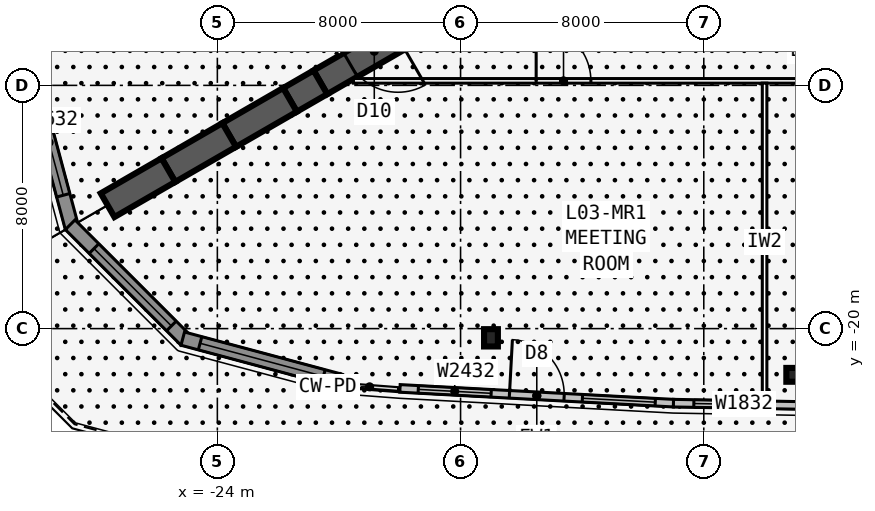
"""IFC4 building model, lengths in metres.
Left out: names, types, materials, properties, quantities, classifications, styles, units other than length and angle.
Written with IfcOpenShell. Run it as: python <this file> out.ifc"""

import sys

from ifc_helpers import new_model, si_unit, direction, frame, frame_2d, origin, origin_2d, place, context, subcontext, project, spatial, rectangle, i_section, extrude, element, fill, save


model = new_model("IFC4")
c1 = context("Model", 3, precision=1e-05, world=origin(), true_north=direction((0.0, 1.0)))
c2 = subcontext(c1, "Body", "Model", "MODEL_VIEW")
j1 = project(units=[si_unit("LENGTHUNIT", "METRE"), si_unit("PLANEANGLEUNIT", "RADIAN")], contexts=[c1])
p1 = place(None, origin())
s1 = spatial("IfcSite", under=j1, at=p1, CompositionType="ELEMENT")
p2 = place(p1, origin())
s2 = spatial("IfcBuilding", under=s1, at=p2, CompositionType="ELEMENT")
p3 = place(p2, frame((0.0, 0.0, 17.5)))
s3 = spatial("IfcBuildingStorey", under=s2, at=p3, CompositionType="ELEMENT", Elevation=17.5)
p4 = place(p3, frame((-16.5, -9.526, 0.0), z_axis=(0.0, 0.0, 1.0), x_axis=(-0.866031398331, -0.499989616998, 0.0)))
e1 = element("IfcWall", 1, at=p4, inside=s3, PredefinedType="SHEAR", context=c2, shape_type="SweptSolid", body=[
    extrude(rectangle(XDim=4.746, YDim=0.9, at=frame_2d((2.373, 0.0))), origin(), (0.0, 0.0, 1.0), 5.0),
])
p5 = place(p4, frame((1.8, 0.0, 0.0)))
e2 = element("IfcOpeningElement", 2, at=p5, cuts=e1, PredefinedType="OPENING", context=c2, shape_type="SweptSolid", body=[
    extrude(rectangle(XDim=1.8, YDim=2.13, at=frame_2d((0.9, 1.065))), frame((0.0, 0.46, 0.0), z_axis=(0.0, -1.0, 0.0), x_axis=(1.0, 0.0, 0.0)), (0.0, 0.0, 1.0), 0.92),
])
p6 = place(p3, frame((-20.61, -11.899, 0.0), z_axis=(0.0, 0.0, 1.0), x_axis=(-0.866009537788, -0.500027479704, 0.0)))
e3 = element("IfcWall", 3, at=p6, inside=s3, PredefinedType="SHEAR", context=c2, shape_type="SweptSolid", body=[
    extrude(rectangle(XDim=1.155, YDim=0.9, at=frame_2d((0.577, 0.0))), origin(), (0.0, 0.0, 1.0), 5.0),
])
for number, where, z_axis, x_axis in (
    (4, (-21.61, -12.477, 0.0), (0.0, 0.0, 1.0), (-0.866, -0.5, 0.0)),
    (5, (-23.61, -13.631, 0.0), (0.0, 0.0, 1.0), (-0.866, -0.5, 0.0)),
    (6, (-25.61, -14.786, 0.0), (0.0, 0.0, 1.0), (-0.866, -0.5, 0.0)),
):
    element("IfcWall", number, at=place(p3, frame(where, z_axis=z_axis, x_axis=x_axis)), inside=s3, PredefinedType="SHEAR", context=c2, shape_type="SweptSolid", body=[
        extrude(rectangle(XDim=2.309, YDim=0.9, at=frame_2d((1.155, 0.0))), origin(), (0.0, 0.0, 1.0), 5.0),
    ])
for number, where, z_axis, x_axis in (
    (7, (-15.0, -20.303, 0.0), (0.0, 0.0, 1.0), (1.0, 0.0, 0.0)),
    (8, (-5.0, -21.521, 0.0), (0.0, 0.0, 1.0), (0.0, -1.0, 0.0)),
):
    element("IfcColumn", number, at=place(p3, frame(where, z_axis=z_axis, x_axis=x_axis)), inside=s3, PredefinedType="COLUMN", context=c2, shape_type="SweptSolid", body=[
        extrude(i_section(OverallWidth=0.455, OverallDepth=0.569, WebThickness=0.078, FlangeThickness=0.125, at=origin_2d()), origin(), (0.0, 0.0, 1.0), 5.0),
    ])
p7 = place(p3, frame((-17.993, -21.967, 0.0), z_axis=(0.0, 0.0, 1.0), x_axis=(0.998546137511, -0.053903722158, 0.0)))
e9 = element("IfcWall", 9, at=p7, inside=s3, PredefinedType="STANDARD", context=c2, shape_type="SweptSolid", body=[
    extrude(rectangle(XDim=9.013, YDim=0.25, at=frame_2d((4.507, 0.0))), origin(), (0.0, 0.0, 1.0), 4.75),
])
p8 = place(p7, frame((3.607, 0.0, 0.0)))
e10 = element("IfcOpeningElement", 10, at=p8, cuts=e9, PredefinedType="OPENING", context=c2, shape_type="SweptSolid", body=[
    extrude(rectangle(XDim=1.8, YDim=2.4, at=frame_2d((0.9, 1.2))), frame((0.0, 0.135, 0.0), z_axis=(0.0, -1.0, 0.0), x_axis=(1.0, 0.0, 0.0)), (0.0, 0.0, 1.0), 0.27),
])
p9 = place(p7, frame((0.603, 0.0, 0.6)))
e11 = element("IfcOpeningElement", 11, at=p9, cuts=e9, PredefinedType="OPENING", context=c2, shape_type="SweptSolid", body=[
    extrude(rectangle(XDim=2.4, YDim=3.2, at=frame_2d((1.2, 1.6))), frame((0.0, 0.135, 0.0), z_axis=(0.0, -1.0, 0.0), x_axis=(1.0, 0.0, 0.0)), (0.0, 0.0, 1.0), 0.27),
])
p10 = place(p7, frame((6.01, 0.0, 0.6)))
e12 = element("IfcOpeningElement", 12, at=p10, cuts=e9, PredefinedType="OPENING", context=c2, shape_type="SweptSolid", body=[
    extrude(rectangle(XDim=2.4, YDim=3.2, at=frame_2d((1.2, 1.6))), frame((0.0, 0.135, 0.0), z_axis=(0.0, -1.0, 0.0), x_axis=(1.0, 0.0, 0.0)), (0.0, 0.0, 1.0), 0.27),
])
p11 = place(p3, frame((-8.998, -22.452, 0.0), z_axis=(0.0, 0.0, 1.0), x_axis=(0.999838308644, -0.017982118018, 0.0)))
e13 = element("IfcWall", 13, at=p11, inside=s3, PredefinedType="STANDARD", context=c2, shape_type="SweptSolid", body=[
    extrude(rectangle(XDim=9.001, YDim=0.25, at=frame_2d((4.501, 0.0))), origin(), (0.0, 0.0, 1.0), 4.75),
])
p12 = place(p11, frame((0.671, 0.0, 0.6)))
e14 = element("IfcOpeningElement", 14, at=p12, cuts=e13, PredefinedType="OPENING", context=c2, shape_type="SweptSolid", body=[
    extrude(rectangle(XDim=1.8, YDim=3.2, at=frame_2d((0.9, 1.6))), frame((0.0, 0.135, 0.0), z_axis=(0.0, -1.0, 0.0), x_axis=(1.0, 0.0, 0.0)), (0.0, 0.0, 1.0), 0.27),
])
p13 = place(p11, frame((5.022, 0.0, 0.0)))
e15 = element("IfcOpeningElement", 15, at=p13, cuts=e13, PredefinedType="OPENING", context=c2, shape_type="SweptSolid", body=[
    extrude(rectangle(XDim=1.8, YDim=2.4, at=frame_2d((0.9, 1.2))), frame((0.0, 0.135, 0.0), z_axis=(0.0, -1.0, 0.0), x_axis=(1.0, 0.0, 0.0)), (0.0, 0.0, 1.0), 0.27),
])
p14 = place(p3, frame((-28.783, -6.409, 0.0), z_axis=(0.0, 0.0, 1.0), x_axis=(-0.258829095032, -0.965923133363, 0.0)))
e16 = element("IfcWall", 16, at=p14, inside=s3, PredefinedType="SOLIDWALL", context=c2, shape_type="SweptSolid", body=[
    extrude(rectangle(XDim=5.379, YDim=0.45, at=frame_2d((2.69, 0.0))), origin(), (0.0, 0.0, 1.0), 4.75),
])
p15 = place(p14, frame((0.59, 0.0, 0.6)))
e17 = element("IfcOpeningElement", 17, at=p15, cuts=e16, PredefinedType="OPENING", context=c2, shape_type="SweptSolid", body=[
    extrude(rectangle(XDim=4.2, YDim=3.2, at=frame_2d((2.1, 1.6))), frame((0.0, 0.235, 0.0), z_axis=(0.0, -1.0, 0.0), x_axis=(1.0, 0.0, 0.0)), (0.0, 0.0, 1.0), 0.47),
])
p16 = place(p3, frame((-30.175, -11.489, 0.0), z_axis=(0.0, 0.0, 1.0), x_axis=(0.258817748921, -0.965926173599, 0.0)))
e18 = element("IfcWall", 18, at=p16, inside=s3, PredefinedType="SOLIDWALL", context=c2, shape_type="SweptSolid", body=[
    extrude(rectangle(XDim=5.38, YDim=0.45, at=frame_2d((2.69, 0.0))), origin(), (0.0, 0.0, 1.0), 4.75),
])
p17 = place(p16, frame((0.671, 0.0, 0.6)))
e19 = element("IfcOpeningElement", 19, at=p17, cuts=e18, PredefinedType="OPENING", context=c2, shape_type="SweptSolid", body=[
    extrude(rectangle(XDim=3.6, YDim=3.2, at=frame_2d((1.8, 1.6))), frame((0.0, 0.235, 0.0), z_axis=(0.0, -1.0, 0.0), x_axis=(1.0, 0.0, 0.0)), (0.0, 0.0, 1.0), 0.47),
])
p18 = place(p3, frame((-28.841, -16.584, 0.0), z_axis=(0.0, 0.0, 1.0), x_axis=(0.707084088779, -0.707129472866, 0.0)))
e20 = element("IfcWall", 20, at=p18, inside=s3, PredefinedType="SOLIDWALL", context=c2, shape_type="SweptSolid", body=[
    extrude(rectangle(XDim=5.379, YDim=0.45, at=frame_2d((2.69, 0.0))), origin(), (0.0, 0.0, 1.0), 4.75),
])
p19 = place(p18, frame((1.108, 0.0, 0.6)))
e21 = element("IfcOpeningElement", 21, at=p19, cuts=e20, PredefinedType="OPENING", context=c2, shape_type="SweptSolid", body=[
    extrude(rectangle(XDim=3.6, YDim=3.2, at=frame_2d((1.8, 1.6))), frame((0.0, 0.235, 0.0), z_axis=(0.0, -1.0, 0.0), x_axis=(1.0, 0.0, 0.0)), (0.0, 0.0, 1.0), 0.47),
])
p20 = place(p3, frame((-25.138, -20.33, 0.0), z_axis=(0.0, 0.0, 1.0), x_axis=(0.965923133363, -0.258829095032, 0.0)))
e22 = element("IfcWall", 22, at=p20, inside=s3, PredefinedType="SOLIDWALL", context=c2, shape_type="SweptSolid", body=[
    extrude(rectangle(XDim=5.379, YDim=0.45, at=frame_2d((2.69, 0.0))), origin(), (0.0, 0.0, 1.0), 4.75),
])
p21 = place(p20, frame((0.59, 0.0, 0.6)))
e23 = element("IfcOpeningElement", 23, at=p21, cuts=e22, PredefinedType="OPENING", context=c2, shape_type="SweptSolid", body=[
    extrude(rectangle(XDim=4.2, YDim=3.2, at=frame_2d((2.1, 1.6))), frame((0.0, 0.235, 0.0), z_axis=(0.0, -1.0, 0.0), x_axis=(1.0, 0.0, 0.0)), (0.0, 0.0, 1.0), 0.47),
])
p22 = place(p3, frame((-19.527, -11.851, 0.0), z_axis=(0.0, 0.0, 1.0), x_axis=(1.0, 0.0, 0.0)))
e24 = element("IfcWall", 24, at=p22, inside=s3, PredefinedType="PARTITIONING", context=c2, shape_type="SweptSolid", body=[
    extrude(rectangle(XDim=39.054, YDim=0.15, at=frame_2d((19.527, 0.0))), origin(), (0.0, 0.0, 1.0), 4.75),
])
p23 = place(p22, frame((6.013, 0.0, 0.0)))
e25 = element("IfcOpeningElement", 25, at=p23, cuts=e24, PredefinedType="OPENING", context=c2, shape_type="SweptSolid", body=[
    extrude(rectangle(XDim=1.8, YDim=2.13, at=frame_2d((0.9, 1.065))), frame((0.0, 0.085, 0.0), z_axis=(0.0, -1.0, 0.0), x_axis=(1.0, 0.0, 0.0)), (0.0, 0.0, 1.0), 0.17),
])
p24 = place(p22, frame((16.627, 0.0, 0.0)))
e26 = element("IfcOpeningElement", 26, at=p24, cuts=e24, PredefinedType="OPENING", context=c2, shape_type="SweptSolid", body=[
    extrude(rectangle(XDim=1.8, YDim=2.13, at=frame_2d((0.9, 1.065))), frame((0.0, 0.085, 0.0), z_axis=(0.0, -1.0, 0.0), x_axis=(1.0, 0.0, 0.0)), (0.0, 0.0, 1.0), 0.17),
])
p25 = place(p22, frame((23.227, 0.0, 0.0)))
e27 = element("IfcOpeningElement", 27, at=p25, cuts=e24, PredefinedType="OPENING", context=c2, shape_type="SweptSolid", body=[
    extrude(rectangle(XDim=1.8, YDim=2.13, at=frame_2d((0.9, 1.065))), frame((0.0, 0.085, 0.0), z_axis=(0.0, -1.0, 0.0), x_axis=(1.0, 0.0, 0.0)), (0.0, 0.0, 1.0), 0.17),
])
p26 = place(p22, frame((31.841, 0.0, 0.0)))
e28 = element("IfcOpeningElement", 28, at=p26, cuts=e24, PredefinedType="OPENING", context=c2, shape_type="SweptSolid", body=[
    extrude(rectangle(XDim=1.8, YDim=2.13, at=frame_2d((0.9, 1.065))), frame((0.0, 0.085, 0.0), z_axis=(0.0, -1.0, 0.0), x_axis=(1.0, 0.0, 0.0)), (0.0, 0.0, 1.0), 0.17),
])
p27 = place(p3, frame((-6.0, -11.926, 0.0), z_axis=(0.0, 0.0, 1.0), x_axis=(0.0, -1.0, 0.0)))
e29 = element("IfcWall", 29, at=p27, inside=s3, PredefinedType="PARTITIONING", context=c2, shape_type="SweptSolid", body=[
    extrude(rectangle(XDim=10.455, YDim=0.15, at=frame_2d((5.228, 0.0))), origin(), (0.0, 0.0, 1.0), 4.75),
])
p28 = place(p3, frame((-0.5, 22.836, 0.0), z_axis=(0.0, 0.0, 1.0), x_axis=(-0.500001677587, -0.866024435227, 0.0)))
e30 = element("IfcWall", 30, at=p28, inside=s3, PredefinedType="PARTITIONING", context=c2, shape_type="SweptSolid", body=[
    extrude(rectangle(XDim=39.054, YDim=0.15, at=frame_2d((19.527, 0.0))), origin(), (0.0, 0.0, 1.0), 4.75),
])
p29 = place(p28, frame((10.414, 0.0, 0.0)))
e31 = element("IfcOpeningElement", 31, at=p29, cuts=e30, PredefinedType="OPENING", context=c2, shape_type="SweptSolid", body=[
    extrude(rectangle(XDim=1.0, YDim=2.13, at=frame_2d((0.5, 1.065))), frame((0.0, 0.085, 0.0), z_axis=(0.0, -1.0, 0.0), x_axis=(1.0, 0.0, 0.0)), (0.0, 0.0, 1.0), 0.17),
])
p30 = place(p28, frame((23.227, 0.0, 0.0)))
e32 = element("IfcOpeningElement", 32, at=p30, cuts=e30, PredefinedType="OPENING", context=c2, shape_type="SweptSolid", body=[
    extrude(rectangle(XDim=1.8, YDim=2.13, at=frame_2d((0.9, 1.065))), frame((0.0, 0.085, 0.0), z_axis=(0.0, -1.0, 0.0), x_axis=(1.0, 0.0, 0.0)), (0.0, 0.0, 1.0), 0.17),
])
p31 = place(p28, frame((27.627, 0.0, 0.0)))
e33 = element("IfcOpeningElement", 33, at=p31, cuts=e30, PredefinedType="OPENING", context=c2, shape_type="SweptSolid", body=[
    extrude(rectangle(XDim=1.0, YDim=2.13, at=frame_2d((0.5, 1.065))), frame((0.0, 0.085, 0.0), z_axis=(0.0, -1.0, 0.0), x_axis=(1.0, 0.0, 0.0)), (0.0, 0.0, 1.0), 0.17),
])
p32 = place(p28, frame((30.277, 0.0, 0.0)))
e34 = element("IfcOpeningElement", 34, at=p32, cuts=e30, PredefinedType="OPENING", context=c2, shape_type="SweptSolid", body=[
    extrude(rectangle(XDim=1.0, YDim=2.13, at=frame_2d((0.5, 1.065))), frame((0.0, 0.085, 0.0), z_axis=(0.0, -1.0, 0.0), x_axis=(1.0, 0.0, 0.0)), (0.0, 0.0, 1.0), 0.17),
])
p33 = place(p28, frame((34.89, 0.0, 0.0)))
e35 = element("IfcOpeningElement", 35, at=p33, cuts=e30, PredefinedType="OPENING", context=c2, shape_type="SweptSolid", body=[
    extrude(rectangle(XDim=1.0, YDim=2.13, at=frame_2d((0.5, 1.065))), frame((0.0, 0.085, 0.0), z_axis=(0.0, -1.0, 0.0), x_axis=(1.0, 0.0, 0.0)), (0.0, 0.0, 1.0), 0.17),
])
p34 = place(p8, origin())
e36 = element("IfcDoor", 36, at=p34, inside=s3, OperationType="DOUBLE_DOOR_SINGLE_SWING", PredefinedType="DOOR", context=c2, shape_type="SweptSolid", body=[
    extrude(rectangle(XDim=1.8, YDim=2.4, at=frame_2d((0.9, 1.2))), frame((0.0, 0.025, 0.0), z_axis=(0.0, -1.0, 0.0), x_axis=(1.0, 0.0, 0.0)), (0.0, 0.0, 1.0), 0.05),
])
fill(e10, e36)
p35 = place(p9, origin())
e37 = element("IfcWindow", 37, at=p35, inside=s3, PartitioningType="SINGLE_PANEL", PredefinedType="WINDOW", context=c2, shape_type="SweptSolid", body=[
    extrude(rectangle(XDim=2.4, YDim=3.2, at=frame_2d((1.2, 1.6))), frame((0.0, 0.03, 0.0), z_axis=(0.0, -1.0, 0.0), x_axis=(1.0, 0.0, 0.0)), (0.0, 0.0, 1.0), 0.06),
])
fill(e11, e37)
p36 = place(p10, origin())
e38 = element("IfcWindow", 38, at=p36, inside=s3, PartitioningType="SINGLE_PANEL", PredefinedType="WINDOW", context=c2, shape_type="SweptSolid", body=[
    extrude(rectangle(XDim=2.4, YDim=3.2, at=frame_2d((1.2, 1.6))), frame((0.0, 0.03, 0.0), z_axis=(0.0, -1.0, 0.0), x_axis=(1.0, 0.0, 0.0)), (0.0, 0.0, 1.0), 0.06),
])
fill(e12, e38)
p37 = place(p12, origin())
e39 = element("IfcWindow", 39, at=p37, inside=s3, PartitioningType="SINGLE_PANEL", PredefinedType="WINDOW", context=c2, shape_type="SweptSolid", body=[
    extrude(rectangle(XDim=1.8, YDim=3.2, at=frame_2d((0.9, 1.6))), frame((0.0, 0.03, 0.0), z_axis=(0.0, -1.0, 0.0), x_axis=(1.0, 0.0, 0.0)), (0.0, 0.0, 1.0), 0.06),
])
fill(e14, e39)
p38 = place(p15, origin())
e40 = element("IfcWindow", 40, at=p38, inside=s3, PartitioningType="SINGLE_PANEL", PredefinedType="WINDOW", context=c2, shape_type="SweptSolid", body=[
    extrude(rectangle(XDim=4.2, YDim=3.2, at=frame_2d((2.1, 1.6))), frame((0.0, 0.03, 0.0), z_axis=(0.0, -1.0, 0.0), x_axis=(1.0, 0.0, 0.0)), (0.0, 0.0, 1.0), 0.06),
])
fill(e17, e40)
p39 = place(p17, origin())
e41 = element("IfcWindow", 41, at=p39, inside=s3, PartitioningType="SINGLE_PANEL", PredefinedType="WINDOW", context=c2, shape_type="SweptSolid", body=[
    extrude(rectangle(XDim=3.6, YDim=3.2, at=frame_2d((1.8, 1.6))), frame((0.0, 0.03, 0.0), z_axis=(0.0, -1.0, 0.0), x_axis=(1.0, 0.0, 0.0)), (0.0, 0.0, 1.0), 0.06),
])
fill(e19, e41)
p40 = place(p19, origin())
e42 = element("IfcWindow", 42, at=p40, inside=s3, PartitioningType="SINGLE_PANEL", PredefinedType="WINDOW", context=c2, shape_type="SweptSolid", body=[
    extrude(rectangle(XDim=3.6, YDim=3.2, at=frame_2d((1.8, 1.6))), frame((0.0, 0.03, 0.0), z_axis=(0.0, -1.0, 0.0), x_axis=(1.0, 0.0, 0.0)), (0.0, 0.0, 1.0), 0.06),
])
fill(e21, e42)
p41 = place(p21, origin())
e43 = element("IfcWindow", 43, at=p41, inside=s3, PartitioningType="SINGLE_PANEL", PredefinedType="WINDOW", context=c2, shape_type="SweptSolid", body=[
    extrude(rectangle(XDim=4.2, YDim=3.2, at=frame_2d((2.1, 1.6))), frame((0.0, 0.03, 0.0), z_axis=(0.0, -1.0, 0.0), x_axis=(1.0, 0.0, 0.0)), (0.0, 0.0, 1.0), 0.06),
])
fill(e23, e43)
p42 = place(p23, origin())
e44 = element("IfcDoor", 44, at=p42, inside=s3, OperationType="DOUBLE_DOOR_SINGLE_SWING", PredefinedType="DOOR", context=c2, shape_type="SweptSolid", body=[
    extrude(rectangle(XDim=1.8, YDim=2.13, at=frame_2d((0.9, 1.065))), frame((0.0, 0.025, 0.0), z_axis=(0.0, -1.0, 0.0), x_axis=(1.0, 0.0, 0.0)), (0.0, 0.0, 1.0), 0.05),
])
fill(e25, e44)
p43 = place(p5, origin())
e45 = element("IfcDoor", 45, at=p43, inside=s3, OperationType="DOUBLE_DOOR_DOUBLE_SWING", PredefinedType="DOOR", context=c2, shape_type="SweptSolid", body=[
    extrude(rectangle(XDim=1.8, YDim=2.13, at=frame_2d((0.9, 1.065))), frame((0.0, 0.025, 0.0), z_axis=(0.0, -1.0, 0.0), x_axis=(1.0, 0.0, 0.0)), (0.0, 0.0, 1.0), 0.05),
])
fill(e2, e45)
save(model, sys.argv[1])
